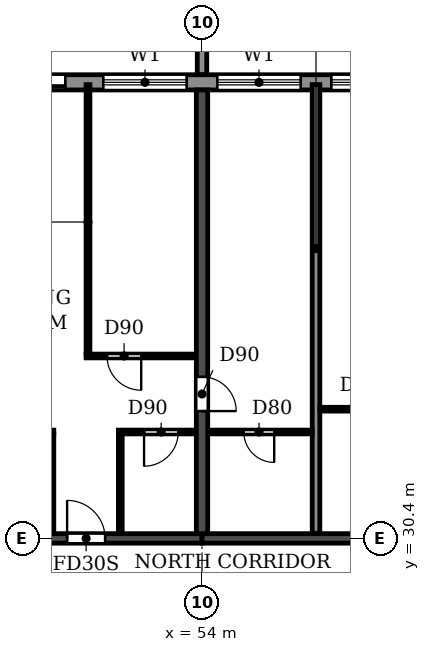
"""IFC4 building model, lengths in metres.
Left out: names, types, materials, properties, quantities, classifications, styles, units other than length and angle.
Written with IfcOpenShell. Run it as: python <this file> out.ifc"""

import sys

from ifc_helpers import new_model, si_unit, direction, frame, frame_2d, origin, place, context, subcontext, project, spatial, polyline, rectangle, outline, extrude, source, transform, mapped, element, fill, save


model = new_model("IFC4")
c1 = context("Model", 3, precision=1e-05, world=origin(), true_north=direction((0.0, 1.0)))
c2 = subcontext(c1, "Body", "Model", "MODEL_VIEW")
j1 = project(units=[si_unit("LENGTHUNIT", "METRE"), si_unit("PLANEANGLEUNIT", "RADIAN")], contexts=[c1])
p1 = place(None, origin())
s1 = spatial("IfcSite", under=j1, at=p1, CompositionType="ELEMENT")
p2 = place(p1, origin())
s2 = spatial("IfcBuilding", under=s1, at=p2, CompositionType="ELEMENT")
p3 = place(p2, frame((0.0, 0.0, 152.1)))
s3 = spatial("IfcBuildingStorey", under=s2, at=p3, CompositionType="ELEMENT", Elevation=152.1)
p4 = place(p3, frame((54.0, 30.525, 0.0), z_axis=(0.0, 0.0, 1.0), x_axis=(0.0, 1.0, 0.0)))
e1 = element("IfcWall", 1, at=p4, inside=s3, PredefinedType="SHEAR", context=c2, shape_type="SweptSolid", body=[
    extrude(rectangle(XDim=11.675, YDim=0.3, at=frame_2d((5.837, 0.0))), origin(), (0.0, 0.0, 1.0), 3.07),
])
p5 = place(p4, frame((3.225, 0.0, 0.0)))
e2 = element("IfcOpeningElement", 2, at=p5, cuts=e1, PredefinedType="OPENING", context=c2, shape_type="SweptSolid", body=[
    extrude(rectangle(XDim=0.9, YDim=2.1, at=frame_2d((0.45, 1.05))), frame((0.0, 0.16, 0.0), z_axis=(0.0, -1.0, 0.0), x_axis=(1.0, 0.0, 0.0)), (0.0, 0.0, 1.0), 0.32),
])
p6 = place(p3, frame((48.0, 30.4, 0.0), z_axis=(0.0, 0.0, 1.0), x_axis=(1.0, 0.0, 0.0)))
e3 = element("IfcWall", 3, at=p6, inside=s3, PredefinedType="SHEAR", context=c2, shape_type="SweptSolid", body=[
    extrude(rectangle(XDim=6.0, YDim=0.25, at=frame_2d((3.0, 0.0))), origin(), (0.0, 0.0, 1.0), 2.47),
])
p7 = place(p6, frame((2.45, 0.0, 0.0)))
e4 = element("IfcOpeningElement", 4, at=p7, cuts=e3, PredefinedType="OPENING", context=c2, shape_type="SweptSolid", body=[
    extrude(rectangle(XDim=1.0, YDim=2.1, at=frame_2d((0.5, 1.05))), frame((0.0, 0.135, 0.0), z_axis=(0.0, -1.0, 0.0), x_axis=(1.0, 0.0, 0.0)), (0.0, 0.0, 1.0), 0.27),
])
p8 = place(p3, frame((54.0, 30.4, 0.0), z_axis=(0.0, 0.0, 1.0), x_axis=(1.0, 0.0, 0.0)))
e5 = element("IfcWall", 5, at=p8, inside=s3, PredefinedType="SHEAR", context=c2, shape_type="SweptSolid", body=[
    extrude(rectangle(XDim=6.0, YDim=0.25, at=frame_2d((3.0, 0.0))), origin(), (0.0, 0.0, 1.0), 2.47),
])
p9 = place(p3, frame((85.317, 42.4, 0.0), z_axis=(0.0, 0.0, 1.0), x_axis=(-1.0, 0.0, 0.0)))
e6 = element("IfcWall", 6, at=p9, inside=s3, PredefinedType="STANDARD", context=c2, shape_type="SweptSolid", body=[
    extrude(rectangle(XDim=68.634, YDim=0.4, at=frame_2d((34.317, 0.0))), origin(), (0.0, 0.0, 1.0), 3.07),
])
p10 = place(p9, frame((64.917, 0.0, 0.0)))
e7 = element("IfcOpeningElement", 7, at=p10, cuts=e6, PredefinedType="OPENING", context=c2, shape_type="SweptSolid", body=[
    extrude(rectangle(XDim=1.8, YDim=2.4, at=frame_2d((0.9, 1.2))), frame((0.0, 0.21, 0.0), z_axis=(0.0, -1.0, 0.0), x_axis=(1.0, 0.0, 0.0)), (0.0, 0.0, 1.0), 0.42),
])
p11 = place(p9, frame((61.717, 0.0, 0.9)))
e8 = element("IfcOpeningElement", 8, at=p11, cuts=e6, PredefinedType="OPENING", context=c2, shape_type="SweptSolid", body=[
    extrude(rectangle(XDim=2.2, YDim=1.5, at=frame_2d((1.1, 0.75))), frame((0.0, 0.21, 0.0), z_axis=(0.0, -1.0, 0.0), x_axis=(1.0, 0.0, 0.0)), (0.0, 0.0, 1.0), 0.42),
])
p12 = place(p9, frame((58.717, 0.0, 0.9)))
e9 = element("IfcOpeningElement", 9, at=p12, cuts=e6, PredefinedType="OPENING", context=c2, shape_type="SweptSolid", body=[
    extrude(rectangle(XDim=2.2, YDim=1.5, at=frame_2d((1.1, 0.75))), frame((0.0, 0.21, 0.0), z_axis=(0.0, -1.0, 0.0), x_axis=(1.0, 0.0, 0.0)), (0.0, 0.0, 1.0), 0.42),
])
p13 = place(p9, frame((55.917, 0.0, 0.0)))
e10 = element("IfcOpeningElement", 10, at=p13, cuts=e6, PredefinedType="OPENING", context=c2, shape_type="SweptSolid", body=[
    extrude(rectangle(XDim=1.8, YDim=2.4, at=frame_2d((0.9, 1.2))), frame((0.0, 0.21, 0.0), z_axis=(0.0, -1.0, 0.0), x_axis=(1.0, 0.0, 0.0)), (0.0, 0.0, 1.0), 0.42),
])
p14 = place(p9, frame((52.917, 0.0, 0.0)))
e11 = element("IfcOpeningElement", 11, at=p14, cuts=e6, PredefinedType="OPENING", context=c2, shape_type="SweptSolid", body=[
    extrude(rectangle(XDim=1.8, YDim=2.4, at=frame_2d((0.9, 1.2))), frame((0.0, 0.21, 0.0), z_axis=(0.0, -1.0, 0.0), x_axis=(1.0, 0.0, 0.0)), (0.0, 0.0, 1.0), 0.42),
])
p15 = place(p9, frame((49.717, 0.0, 0.9)))
e12 = element("IfcOpeningElement", 12, at=p15, cuts=e6, PredefinedType="OPENING", context=c2, shape_type="SweptSolid", body=[
    extrude(rectangle(XDim=2.2, YDim=1.5, at=frame_2d((1.1, 0.75))), frame((0.0, 0.21, 0.0), z_axis=(0.0, -1.0, 0.0), x_axis=(1.0, 0.0, 0.0)), (0.0, 0.0, 1.0), 0.42),
])
p16 = place(p9, frame((46.717, 0.0, 0.9)))
e13 = element("IfcOpeningElement", 13, at=p16, cuts=e6, PredefinedType="OPENING", context=c2, shape_type="SweptSolid", body=[
    extrude(rectangle(XDim=2.2, YDim=1.5, at=frame_2d((1.1, 0.75))), frame((0.0, 0.21, 0.0), z_axis=(0.0, -1.0, 0.0), x_axis=(1.0, 0.0, 0.0)), (0.0, 0.0, 1.0), 0.42),
])
p17 = place(p9, frame((43.717, 0.0, 0.9)))
e14 = element("IfcOpeningElement", 14, at=p17, cuts=e6, PredefinedType="OPENING", context=c2, shape_type="SweptSolid", body=[
    extrude(rectangle(XDim=2.2, YDim=1.5, at=frame_2d((1.1, 0.75))), frame((0.0, 0.21, 0.0), z_axis=(0.0, -1.0, 0.0), x_axis=(1.0, 0.0, 0.0)), (0.0, 0.0, 1.0), 0.42),
])
p18 = place(p9, frame((40.917, 0.0, 0.0)))
e15 = element("IfcOpeningElement", 15, at=p18, cuts=e6, PredefinedType="OPENING", context=c2, shape_type="SweptSolid", body=[
    extrude(rectangle(XDim=1.8, YDim=2.4, at=frame_2d((0.9, 1.2))), frame((0.0, 0.21, 0.0), z_axis=(0.0, -1.0, 0.0), x_axis=(1.0, 0.0, 0.0)), (0.0, 0.0, 1.0), 0.42),
])
p19 = place(p9, frame((37.717, 0.0, 0.9)))
e16 = element("IfcOpeningElement", 16, at=p19, cuts=e6, PredefinedType="OPENING", context=c2, shape_type="SweptSolid", body=[
    extrude(rectangle(XDim=2.2, YDim=1.5, at=frame_2d((1.1, 0.75))), frame((0.0, 0.21, 0.0), z_axis=(0.0, -1.0, 0.0), x_axis=(1.0, 0.0, 0.0)), (0.0, 0.0, 1.0), 0.42),
])
p20 = place(p9, frame((34.917, 0.0, 0.0)))
e17 = element("IfcOpeningElement", 17, at=p20, cuts=e6, PredefinedType="OPENING", context=c2, shape_type="SweptSolid", body=[
    extrude(rectangle(XDim=1.8, YDim=2.4, at=frame_2d((0.9, 1.2))), frame((0.0, 0.21, 0.0), z_axis=(0.0, -1.0, 0.0), x_axis=(1.0, 0.0, 0.0)), (0.0, 0.0, 1.0), 0.42),
])
p21 = place(p9, frame((31.717, 0.0, 0.9)))
e18 = element("IfcOpeningElement", 18, at=p21, cuts=e6, PredefinedType="OPENING", context=c2, shape_type="SweptSolid", body=[
    extrude(rectangle(XDim=2.2, YDim=1.5, at=frame_2d((1.1, 0.75))), frame((0.0, 0.21, 0.0), z_axis=(0.0, -1.0, 0.0), x_axis=(1.0, 0.0, 0.0)), (0.0, 0.0, 1.0), 0.42),
])
p22 = place(p9, frame((28.717, 0.0, 0.9)))
e19 = element("IfcOpeningElement", 19, at=p22, cuts=e6, PredefinedType="OPENING", context=c2, shape_type="SweptSolid", body=[
    extrude(rectangle(XDim=2.2, YDim=1.5, at=frame_2d((1.1, 0.75))), frame((0.0, 0.21, 0.0), z_axis=(0.0, -1.0, 0.0), x_axis=(1.0, 0.0, 0.0)), (0.0, 0.0, 1.0), 0.42),
])
p23 = place(p9, frame((25.717, 0.0, 0.9)))
e20 = element("IfcOpeningElement", 20, at=p23, cuts=e6, PredefinedType="OPENING", context=c2, shape_type="SweptSolid", body=[
    extrude(rectangle(XDim=2.2, YDim=1.5, at=frame_2d((1.1, 0.75))), frame((0.0, 0.21, 0.0), z_axis=(0.0, -1.0, 0.0), x_axis=(1.0, 0.0, 0.0)), (0.0, 0.0, 1.0), 0.42),
])
p24 = place(p9, frame((22.717, 0.0, 0.9)))
e21 = element("IfcOpeningElement", 21, at=p24, cuts=e6, PredefinedType="OPENING", context=c2, shape_type="SweptSolid", body=[
    extrude(rectangle(XDim=2.2, YDim=1.5, at=frame_2d((1.1, 0.75))), frame((0.0, 0.21, 0.0), z_axis=(0.0, -1.0, 0.0), x_axis=(1.0, 0.0, 0.0)), (0.0, 0.0, 1.0), 0.42),
])
p25 = place(p9, frame((19.917, 0.0, 0.0)))
e22 = element("IfcOpeningElement", 22, at=p25, cuts=e6, PredefinedType="OPENING", context=c2, shape_type="SweptSolid", body=[
    extrude(rectangle(XDim=1.8, YDim=2.4, at=frame_2d((0.9, 1.2))), frame((0.0, 0.21, 0.0), z_axis=(0.0, -1.0, 0.0), x_axis=(1.0, 0.0, 0.0)), (0.0, 0.0, 1.0), 0.42),
])
p26 = place(p9, frame((16.717, 0.0, 0.9)))
e23 = element("IfcOpeningElement", 23, at=p26, cuts=e6, PredefinedType="OPENING", context=c2, shape_type="SweptSolid", body=[
    extrude(rectangle(XDim=2.2, YDim=1.5, at=frame_2d((1.1, 0.75))), frame((0.0, 0.21, 0.0), z_axis=(0.0, -1.0, 0.0), x_axis=(1.0, 0.0, 0.0)), (0.0, 0.0, 1.0), 0.42),
])
p27 = place(p9, frame((13.717, 0.0, 0.9)))
e24 = element("IfcOpeningElement", 24, at=p27, cuts=e6, PredefinedType="OPENING", context=c2, shape_type="SweptSolid", body=[
    extrude(rectangle(XDim=2.2, YDim=1.5, at=frame_2d((1.1, 0.75))), frame((0.0, 0.21, 0.0), z_axis=(0.0, -1.0, 0.0), x_axis=(1.0, 0.0, 0.0)), (0.0, 0.0, 1.0), 0.42),
])
p28 = place(p9, frame((10.917, 0.0, 0.0)))
e25 = element("IfcOpeningElement", 25, at=p28, cuts=e6, PredefinedType="OPENING", context=c2, shape_type="SweptSolid", body=[
    extrude(rectangle(XDim=1.8, YDim=2.4, at=frame_2d((0.9, 1.2))), frame((0.0, 0.21, 0.0), z_axis=(0.0, -1.0, 0.0), x_axis=(1.0, 0.0, 0.0)), (0.0, 0.0, 1.0), 0.42),
])
p29 = place(p9, frame((7.717, 0.0, 0.9)))
e26 = element("IfcOpeningElement", 26, at=p29, cuts=e6, PredefinedType="OPENING", context=c2, shape_type="SweptSolid", body=[
    extrude(rectangle(XDim=2.2, YDim=1.5, at=frame_2d((1.1, 0.75))), frame((0.0, 0.21, 0.0), z_axis=(0.0, -1.0, 0.0), x_axis=(1.0, 0.0, 0.0)), (0.0, 0.0, 1.0), 0.42),
])
p30 = place(p9, frame((4.717, 0.0, 0.9)))
e27 = element("IfcOpeningElement", 27, at=p30, cuts=e6, PredefinedType="OPENING", context=c2, shape_type="SweptSolid", body=[
    extrude(rectangle(XDim=2.2, YDim=1.5, at=frame_2d((1.1, 0.75))), frame((0.0, 0.21, 0.0), z_axis=(0.0, -1.0, 0.0), x_axis=(1.0, 0.0, 0.0)), (0.0, 0.0, 1.0), 0.42),
])
p31 = place(p9, frame((1.917, 0.0, 0.0)))
e28 = element("IfcOpeningElement", 28, at=p31, cuts=e6, PredefinedType="OPENING", context=c2, shape_type="SweptSolid", body=[
    extrude(rectangle(XDim=1.8, YDim=2.4, at=frame_2d((0.9, 1.2))), frame((0.0, 0.21, 0.0), z_axis=(0.0, -1.0, 0.0), x_axis=(1.0, 0.0, 0.0)), (0.0, 0.0, 1.0), 0.42),
])
m1 = source(origin(), c2, "Body", "SweptSolid", [
    extrude(outline(polyline([(0.0, 0.0), (0.25, 0.0), (0.25, 3.1), (0.0, 3.1), (0.0, 0.0)])), origin(), (0.0, 0.0, 1.0), 3.1),
])
p32 = place(p3, frame((53.875, 42.6, 0.0)))
e29 = element("IfcWall", 29, at=p32, inside=s3, PredefinedType="STANDARD", context=c2, shape_type="MappedRepresentation", body=[
    mapped(m1, transform((0.0, 0.0, 0.0))),
])
p33 = place(p3, frame((57.0, 30.535, 0.0), z_axis=(0.0, 0.0, 1.0), x_axis=(0.0, 1.0, 0.0)))
e30 = element("IfcWall", 30, at=p33, inside=s3, PredefinedType="PARTITIONING", context=c2, shape_type="SweptSolid", body=[
    extrude(rectangle(XDim=11.805, YDim=0.2, at=frame_2d((5.903, 0.0))), origin(), (0.0, 0.0, 1.0), 3.07),
])
p34 = place(p3, frame((48.16, 33.2, 0.0), z_axis=(0.0, 0.0, 1.0), x_axis=(1.0, 0.0, 0.0)))
e31 = element("IfcWall", 31, at=p34, inside=s3, PredefinedType="PARTITIONING", context=c2, shape_type="SweptSolid", body=[
    extrude(rectangle(XDim=1.94, YDim=0.1, at=frame_2d((0.97, 0.0))), origin(), (0.0, 0.0, 1.0), 3.07),
])
p35 = place(p34, frame((0.465, 0.0, 0.0)))
e32 = element("IfcOpeningElement", 32, at=p35, cuts=e31, PredefinedType="OPENING", context=c2, shape_type="SweptSolid", body=[
    extrude(rectangle(XDim=0.8, YDim=2.1, at=frame_2d((0.4, 1.05))), frame((0.0, 0.06, 0.0), z_axis=(0.0, -1.0, 0.0), x_axis=(1.0, 0.0, 0.0)), (0.0, 0.0, 1.0), 0.12),
])
p36 = place(p3, frame((51.8, 33.2, 0.0), z_axis=(0.0, 0.0, 1.0), x_axis=(1.0, 0.0, 0.0)))
e33 = element("IfcWall", 33, at=p36, inside=s3, PredefinedType="PARTITIONING", context=c2, shape_type="SweptSolid", body=[
    extrude(rectangle(XDim=2.04, YDim=0.1, at=frame_2d((1.02, 0.0))), origin(), (0.0, 0.0, 1.0), 3.07),
])
p37 = place(p36, frame((0.675, 0.0, 0.0)))
e34 = element("IfcOpeningElement", 34, at=p37, cuts=e33, PredefinedType="OPENING", context=c2, shape_type="SweptSolid", body=[
    extrude(rectangle(XDim=0.9, YDim=2.1, at=frame_2d((0.45, 1.05))), frame((0.0, 0.06, 0.0), z_axis=(0.0, -1.0, 0.0), x_axis=(1.0, 0.0, 0.0)), (0.0, 0.0, 1.0), 0.12),
])
p38 = place(p3, frame((54.16, 33.2, 0.0), z_axis=(0.0, 0.0, 1.0), x_axis=(1.0, 0.0, 0.0)))
e35 = element("IfcWall", 35, at=p38, inside=s3, PredefinedType="PARTITIONING", context=c2, shape_type="SweptSolid", body=[
    extrude(rectangle(XDim=2.74, YDim=0.1, at=frame_2d((1.37, 0.0))), origin(), (0.0, 0.0, 1.0), 3.07),
])
p39 = place(p38, frame((0.94, 0.0, 0.0)))
e36 = element("IfcOpeningElement", 36, at=p39, cuts=e35, PredefinedType="OPENING", context=c2, shape_type="SweptSolid", body=[
    extrude(rectangle(XDim=0.8, YDim=2.1, at=frame_2d((0.4, 1.05))), frame((0.0, 0.06, 0.0), z_axis=(0.0, -1.0, 0.0), x_axis=(1.0, 0.0, 0.0)), (0.0, 0.0, 1.0), 0.12),
])
p40 = place(p3, frame((57.1, 33.8, 0.0), z_axis=(0.0, 0.0, 1.0), x_axis=(1.0, 0.0, 0.0)))
e37 = element("IfcWall", 37, at=p40, inside=s3, PredefinedType="PARTITIONING", context=c2, shape_type="SweptSolid", body=[
    extrude(rectangle(XDim=2.74, YDim=0.1, at=frame_2d((1.37, 0.0))), origin(), (0.0, 0.0, 1.0), 3.07),
])
p41 = place(p40, frame((1.0, 0.0, 0.0)))
e38 = element("IfcOpeningElement", 38, at=p41, cuts=e37, PredefinedType="OPENING", context=c2, shape_type="SweptSolid", body=[
    extrude(rectangle(XDim=0.8, YDim=2.1, at=frame_2d((0.4, 1.05))), frame((0.0, 0.06, 0.0), z_axis=(0.0, -1.0, 0.0), x_axis=(1.0, 0.0, 0.0)), (0.0, 0.0, 1.0), 0.12),
])
p42 = place(p3, frame((50.95, 35.2, 0.0), z_axis=(0.0, 0.0, 1.0), x_axis=(1.0, 0.0, 0.0)))
e39 = element("IfcWall", 39, at=p42, inside=s3, PredefinedType="PARTITIONING", context=c2, shape_type="SweptSolid", body=[
    extrude(rectangle(XDim=2.89, YDim=0.1, at=frame_2d((1.445, 0.0))), origin(), (0.0, 0.0, 1.0), 3.07),
])
p43 = place(p42, frame((0.55, 0.0, 0.0)))
e40 = element("IfcOpeningElement", 40, at=p43, cuts=e39, PredefinedType="OPENING", context=c2, shape_type="SweptSolid", body=[
    extrude(rectangle(XDim=0.9, YDim=2.1, at=frame_2d((0.45, 1.05))), frame((0.0, 0.06, 0.0), z_axis=(0.0, -1.0, 0.0), x_axis=(1.0, 0.0, 0.0)), (0.0, 0.0, 1.0), 0.12),
])
p44 = place(p3, frame((50.05, 30.535, 0.0), z_axis=(0.0, 0.0, 1.0), x_axis=(0.0, 1.0, 0.0)))
e41 = element("IfcWall", 41, at=p44, inside=s3, PredefinedType="PARTITIONING", context=c2, shape_type="SweptSolid", body=[
    extrude(rectangle(XDim=2.615, YDim=0.1, at=frame_2d((1.308, 0.0))), origin(), (0.0, 0.0, 1.0), 3.07),
])
p45 = place(p3, frame((51.0, 35.25, 0.0), z_axis=(0.0, 0.0, 1.0), x_axis=(0.0, 1.0, 0.0)))
e42 = element("IfcWall", 42, at=p45, inside=s3, PredefinedType="PARTITIONING", context=c2, shape_type="SweptSolid", body=[
    extrude(rectangle(XDim=7.09, YDim=0.1, at=frame_2d((3.545, 0.0))), origin(), (0.0, 0.0, 1.0), 3.07),
])
p46 = place(p3, frame((51.85, 30.535, 0.0), z_axis=(0.0, 0.0, 1.0), x_axis=(0.0, 1.0, 0.0)))
e43 = element("IfcWall", 43, at=p46, inside=s3, PredefinedType="PARTITIONING", context=c2, shape_type="SweptSolid", body=[
    extrude(rectangle(XDim=2.615, YDim=0.1, at=frame_2d((1.308, 0.0))), origin(), (0.0, 0.0, 1.0), 3.07),
])
p47 = place(p20, origin())
e44 = element("IfcDoor", 44, at=p47, inside=s3, OperationType="DOUBLE_DOOR_SLIDING", PredefinedType="DOOR", context=c2, shape_type="SweptSolid", body=[
    extrude(rectangle(XDim=1.8, YDim=2.4, at=frame_2d((0.9, 1.2))), frame((0.0, 0.025, 0.0), z_axis=(0.0, -1.0, 0.0), x_axis=(1.0, 0.0, 0.0)), (0.0, 0.0, 1.0), 0.05),
])
fill(e17, e44)
p48 = place(p21, origin())
e45 = element("IfcWindow", 45, at=p48, inside=s3, PartitioningType="DOUBLE_PANEL_HORIZONTAL", PredefinedType="WINDOW", context=c2, shape_type="SweptSolid", body=[
    extrude(rectangle(XDim=2.2, YDim=1.5, at=frame_2d((1.1, 0.75))), frame((0.0, 0.03, 0.0), z_axis=(0.0, -1.0, 0.0), x_axis=(1.0, 0.0, 0.0)), (0.0, 0.0, 1.0), 0.06),
])
fill(e18, e45)
p49 = place(p22, origin())
e46 = element("IfcWindow", 46, at=p49, inside=s3, PartitioningType="DOUBLE_PANEL_HORIZONTAL", PredefinedType="WINDOW", context=c2, shape_type="SweptSolid", body=[
    extrude(rectangle(XDim=2.2, YDim=1.5, at=frame_2d((1.1, 0.75))), frame((0.0, 0.03, 0.0), z_axis=(0.0, -1.0, 0.0), x_axis=(1.0, 0.0, 0.0)), (0.0, 0.0, 1.0), 0.06),
])
fill(e19, e46)
p50 = place(p23, origin())
e47 = element("IfcWindow", 47, at=p50, inside=s3, PartitioningType="DOUBLE_PANEL_HORIZONTAL", PredefinedType="WINDOW", context=c2, shape_type="SweptSolid", body=[
    extrude(rectangle(XDim=2.2, YDim=1.5, at=frame_2d((1.1, 0.75))), frame((0.0, 0.03, 0.0), z_axis=(0.0, -1.0, 0.0), x_axis=(1.0, 0.0, 0.0)), (0.0, 0.0, 1.0), 0.06),
])
fill(e20, e47)
p51 = place(p39, frame((0.8, 0.0, 0.0), z_axis=(0.0, 0.0, 1.0), x_axis=(-1.0, 0.0, 0.0)))
e48 = element("IfcDoor", 48, at=p51, inside=s3, OperationType="SINGLE_SWING_LEFT", PredefinedType="DOOR", context=c2, shape_type="SweptSolid", body=[
    extrude(rectangle(XDim=0.8, YDim=2.1, at=frame_2d((0.4, 1.05))), frame((0.0, 0.025, 0.0), z_axis=(0.0, -1.0, 0.0), x_axis=(1.0, 0.0, 0.0)), (0.0, 0.0, 1.0), 0.05),
])
fill(e36, e48)
p52 = place(p7, origin())
e49 = element("IfcDoor", 49, at=p52, inside=s3, OperationType="SINGLE_SWING_LEFT", PredefinedType="DOOR", context=c2, shape_type="SweptSolid", body=[
    extrude(rectangle(XDim=1.0, YDim=2.1, at=frame_2d((0.5, 1.05))), frame((0.0, 0.025, 0.0), z_axis=(0.0, -1.0, 0.0), x_axis=(1.0, 0.0, 0.0)), (0.0, 0.0, 1.0), 0.05),
])
fill(e4, e49)
p53 = place(p43, frame((0.9, 0.0, 0.0), z_axis=(0.0, 0.0, 1.0), x_axis=(-1.0, 0.0, 0.0)))
e50 = element("IfcDoor", 50, at=p53, inside=s3, OperationType="SINGLE_SWING_LEFT", PredefinedType="DOOR", context=c2, shape_type="SweptSolid", body=[
    extrude(rectangle(XDim=0.9, YDim=2.1, at=frame_2d((0.45, 1.05))), frame((0.0, 0.025, 0.0), z_axis=(0.0, -1.0, 0.0), x_axis=(1.0, 0.0, 0.0)), (0.0, 0.0, 1.0), 0.05),
])
fill(e40, e50)
p54 = place(p37, frame((0.9, 0.0, 0.0), z_axis=(0.0, 0.0, 1.0), x_axis=(-1.0, 0.0, 0.0)))
e51 = element("IfcDoor", 51, at=p54, inside=s3, OperationType="SINGLE_SWING_RIGHT", PredefinedType="DOOR", context=c2, shape_type="SweptSolid", body=[
    extrude(rectangle(XDim=0.9, YDim=2.1, at=frame_2d((0.45, 1.05))), frame((0.0, 0.025, 0.0), z_axis=(0.0, -1.0, 0.0), x_axis=(1.0, 0.0, 0.0)), (0.0, 0.0, 1.0), 0.05),
])
fill(e34, e51)
p55 = place(p5, frame((0.9, 0.0, 0.0), z_axis=(0.0, 0.0, 1.0), x_axis=(-1.0, 0.0, 0.0)))
e52 = element("IfcDoor", 52, at=p55, inside=s3, OperationType="SINGLE_SWING_RIGHT", PredefinedType="DOOR", context=c2, shape_type="SweptSolid", body=[
    extrude(rectangle(XDim=0.9, YDim=2.1, at=frame_2d((0.45, 1.05))), frame((0.0, 0.025, 0.0), z_axis=(0.0, -1.0, 0.0), x_axis=(1.0, 0.0, 0.0)), (0.0, 0.0, 1.0), 0.05),
])
fill(e2, e52)
save(model, sys.argv[1])
